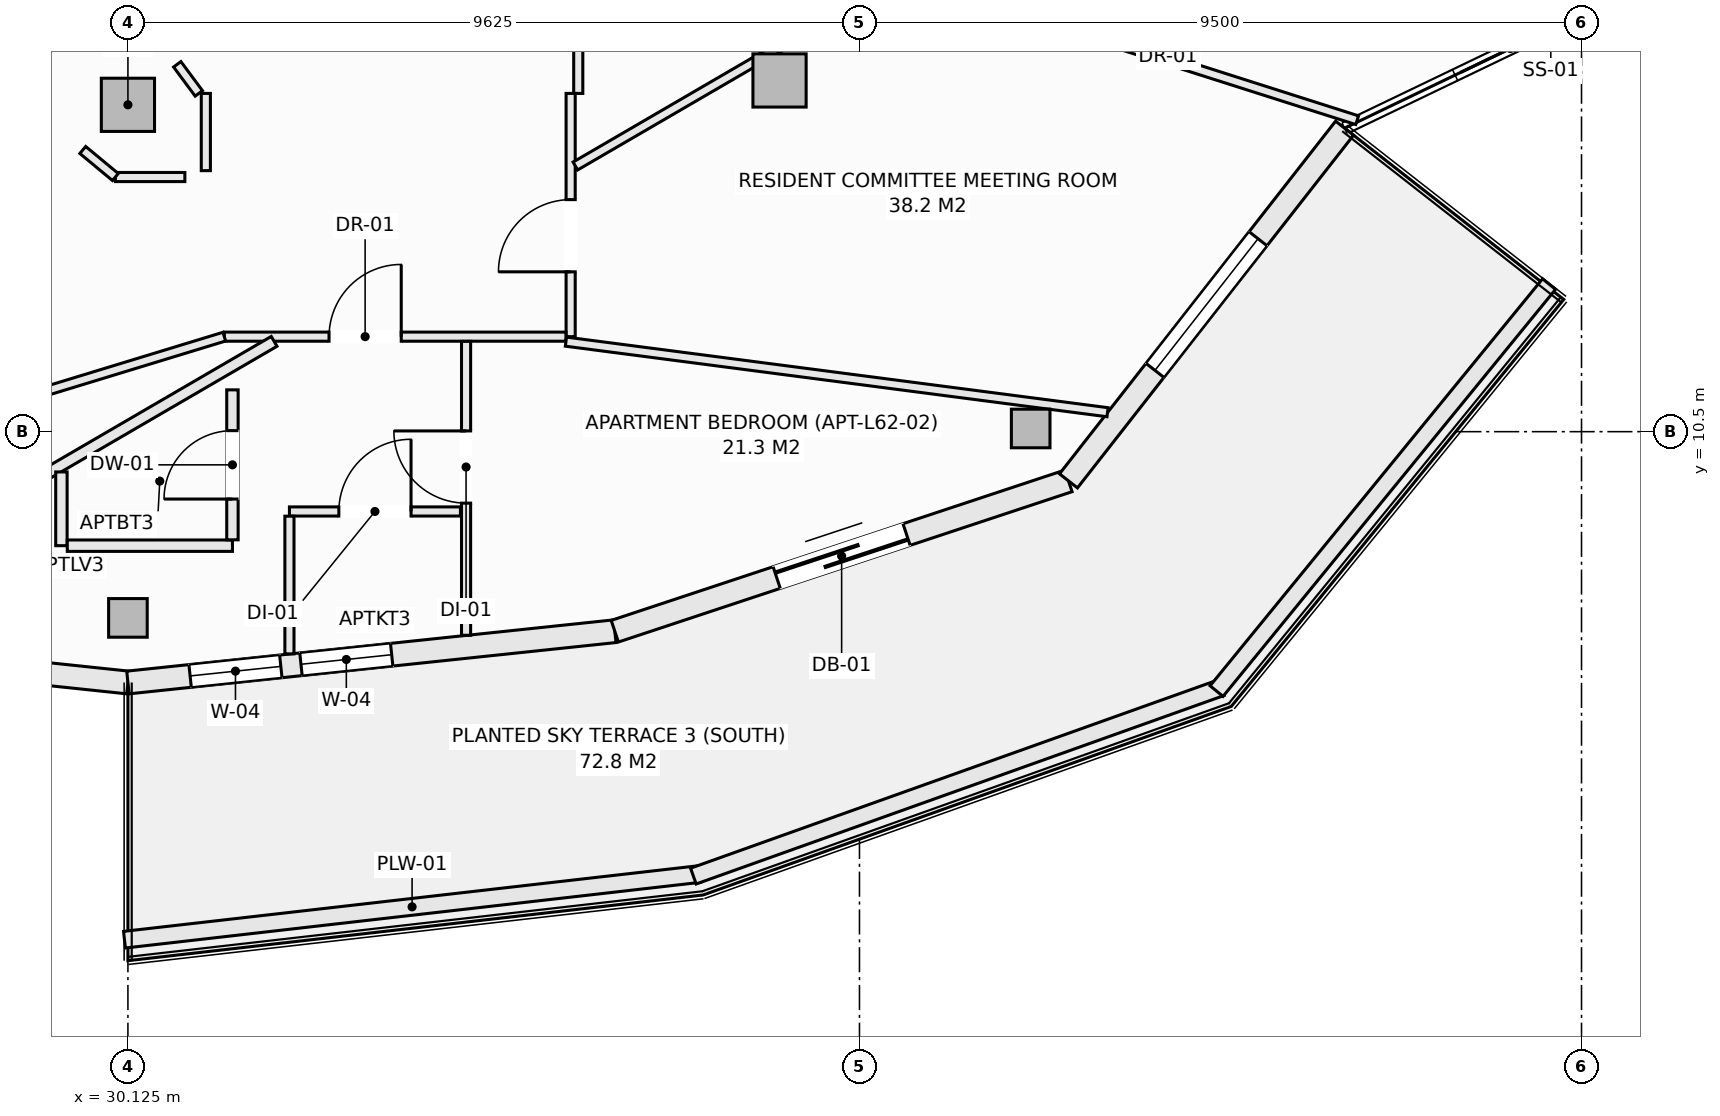
"""IFC4 building model, lengths in metres.
Left out: names, types, materials, properties, quantities, classifications, styles, units other than length and angle.
Written with IfcOpenShell. Run it as: python <this file> out.ifc"""

import sys

from ifc_helpers import new_model, si_unit, direction, frame, frame_2d, origin, origin_2d, place, context, subcontext, project, spatial, rectangle, hollow_rectangle, extrude, element, fill, save


model = new_model("IFC4")
c1 = context("Model", 3, precision=1e-05, world=origin(), true_north=direction((0.0, 1.0)))
c2 = subcontext(c1, "Body", "Model", "MODEL_VIEW")
j1 = project(units=[si_unit("LENGTHUNIT", "METRE"), si_unit("PLANEANGLEUNIT", "RADIAN")], contexts=[c1])
p1 = place(None, origin())
s1 = spatial("IfcSite", under=j1, at=p1, CompositionType="ELEMENT")
p2 = place(p1, origin())
s2 = spatial("IfcBuilding", under=s1, at=p2, CompositionType="ELEMENT")
p3 = place(p2, frame((0.0, 0.0, 232.7)))
s3 = spatial("IfcBuildingStorey", under=s2, at=p3, CompositionType="ELEMENT", Elevation=232.7)
for number, where, z_axis, x_axis in (
    (1, (30.125, 8.05, -0.27), (0.0, 0.0, 1.0), (1.0, 0.0, 0.0)),
    (2, (42.003, 10.542, -0.27), (0.0, 0.0, 1.0), (1.0, 0.0, 0.0)),
):
    element("IfcColumn", number, at=place(p3, frame(where, z_axis=z_axis, x_axis=x_axis)), inside=s3, PredefinedType="COLUMN", context=c2, shape_type="SweptSolid", body=[
        extrude(hollow_rectangle(XDim=0.508, YDim=0.508, WallThickness=0.019, at=origin_2d()), origin(), (0.0, 0.0, 1.0), 3.3),
    ])
for number, where, z_axis, x_axis in (
    (3, (30.125, 14.8, -0.27), (0.0, 0.0, 1.0), (1.0, 0.0, 0.0)),
    (4, (38.698, 15.121, -0.27), (0.0, 0.0, 1.0), (1.0, 0.0, 0.0)),
):
    element("IfcColumn", number, at=place(p3, frame(where, z_axis=z_axis, x_axis=x_axis)), inside=s3, PredefinedType="COLUMN", context=c2, shape_type="SweptSolid", body=[
        extrude(rectangle(XDim=0.7, YDim=0.7, at=origin_2d()), origin(), (0.0, 0.0, 1.0), 3.3),
    ])
p4 = place(p3, frame((23.719, 7.875, 0.0), z_axis=(0.0, 0.0, 1.0), x_axis=(0.994497142298, -0.104763705363, 0.0)))
e5 = element("IfcWall", 5, at=p4, inside=s3, PredefinedType="SOLIDWALL", context=c2, shape_type="SweptSolid", body=[
    extrude(rectangle(XDim=6.441, YDim=0.3, at=frame_2d((3.221, 0.0))), origin(), (0.0, 0.0, 1.0), 2.605),
])
p5 = place(p4, frame((2.121, 0.0, 0.72)))
e6 = element("IfcOpeningElement", 6, at=p5, cuts=e5, PredefinedType="OPENING", context=c2, shape_type="SweptSolid", body=[
    extrude(rectangle(XDim=2.2, YDim=1.65, at=frame_2d((1.1, 0.825))), frame((0.0, 0.16, 0.0), z_axis=(0.0, -1.0, 0.0), x_axis=(1.0, 0.0, 0.0)), (0.0, 0.0, 1.0), 0.32),
])
p6 = place(p3, frame((30.125, 7.2, 0.0), z_axis=(0.0, 0.0, 1.0), x_axis=(0.994497142298, 0.104763705363, 0.0)))
e7 = element("IfcWall", 7, at=p6, inside=s3, PredefinedType="SOLIDWALL", context=c2, shape_type="SweptSolid", body=[
    extrude(rectangle(XDim=6.441, YDim=0.3, at=frame_2d((3.221, 0.0))), origin(), (0.0, 0.0, 1.0), 2.605),
])
p7 = place(p6, frame((0.823, 0.0, 0.72)))
e8 = element("IfcOpeningElement", 8, at=p7, cuts=e7, PredefinedType="OPENING", context=c2, shape_type="SweptSolid", body=[
    extrude(rectangle(XDim=1.2, YDim=1.65, at=frame_2d((0.6, 0.825))), frame((0.0, 0.16, 0.0), z_axis=(0.0, -1.0, 0.0), x_axis=(1.0, 0.0, 0.0)), (0.0, 0.0, 1.0), 0.32),
])
p8 = place(p6, frame((2.289, 0.0, 0.72)))
e9 = element("IfcOpeningElement", 9, at=p8, cuts=e7, PredefinedType="OPENING", context=c2, shape_type="SweptSolid", body=[
    extrude(rectangle(XDim=1.2, YDim=1.65, at=frame_2d((0.6, 0.825))), frame((0.0, 0.16, 0.0), z_axis=(0.0, -1.0, 0.0), x_axis=(1.0, 0.0, 0.0)), (0.0, 0.0, 1.0), 0.32),
])
p9 = place(p3, frame((36.531, 7.875, 0.0), z_axis=(0.0, 0.0, 1.0), x_axis=(0.949240877604, 0.314550085495, 0.0)))
e10 = element("IfcWall", 10, at=p9, inside=s3, PredefinedType="SOLIDWALL", context=c2, shape_type="SweptSolid", body=[
    extrude(rectangle(XDim=6.288, YDim=0.3, at=frame_2d((3.144, 0.0))), origin(), (0.0, 0.0, 1.0), 2.605),
])
p10 = place(p9, frame((2.244, 0.0, 0.0)))
e11 = element("IfcOpeningElement", 11, at=p10, cuts=e10, PredefinedType="OPENING", context=c2, shape_type="SweptSolid", body=[
    extrude(rectangle(XDim=1.8, YDim=2.25, at=frame_2d((0.9, 1.125))), frame((0.0, 0.16, 0.0), z_axis=(0.0, -1.0, 0.0), x_axis=(1.0, 0.0, 0.0)), (0.0, 0.0, 1.0), 0.32),
])
p11 = place(p3, frame((42.5, 9.853, 0.0), z_axis=(0.0, 0.0, 1.0), x_axis=(0.616450126935, 0.787393955401, 0.0)))
e12 = element("IfcWall", 12, at=p11, inside=s3, PredefinedType="SOLIDWALL", context=c2, shape_type="SweptSolid", body=[
    extrude(rectangle(XDim=5.893, YDim=0.3, at=frame_2d((2.946, 0.0))), origin(), (0.0, 0.0, 1.0), 2.605),
])
p12 = place(p11, frame((1.846, 0.0, 0.72)))
e13 = element("IfcOpeningElement", 13, at=p12, cuts=e12, PredefinedType="OPENING", context=c2, shape_type="SweptSolid", body=[
    extrude(rectangle(XDim=2.2, YDim=1.65, at=frame_2d((1.1, 0.825))), frame((0.0, 0.16, 0.0), z_axis=(0.0, -1.0, 0.0), x_axis=(1.0, 0.0, 0.0)), (0.0, 0.0, 1.0), 0.32),
])
p13 = place(p3, frame((30.08, 3.816, 0.0), z_axis=(0.0, 0.0, 1.0), x_axis=(0.993546198781, 0.113428175021, 0.0)))
e14 = element("IfcWall", 14, at=p13, inside=s3, PredefinedType="PARAPET", context=c2, shape_type="SweptSolid", body=[
    extrude(rectangle(XDim=7.617, YDim=0.22, at=frame_2d((3.809, 0.0))), origin(), (0.0, 0.0, 1.0), 0.52),
])
p14 = place(p3, frame((37.565, 4.653, 0.0), z_axis=(0.0, 0.0, 1.0), x_axis=(0.941780086523, 0.336229488042, 0.0)))
e15 = element("IfcWall", 15, at=p14, inside=s3, PredefinedType="PARAPET", context=c2, shape_type="SweptSolid", body=[
    extrude(rectangle(XDim=7.378, YDim=0.22, at=frame_2d((3.689, 0.0))), origin(), (0.0, 0.0, 1.0), 0.52),
])
p15 = place(p3, frame((44.448, 7.087, 0.0), z_axis=(0.0, 0.0, 1.0), x_axis=(0.632697312147, 0.774399193699, 0.0)))
e16 = element("IfcWall", 16, at=p15, inside=s3, PredefinedType="PARAPET", context=c2, shape_type="SweptSolid", body=[
    extrude(rectangle(XDim=6.914, YDim=0.22, at=frame_2d((3.457, 0.0))), origin(), (0.0, 0.0, 1.0), 0.52),
])
p16 = place(p3, frame((36.05, 14.95, 0.0), z_axis=(0.0, 0.0, 1.0), x_axis=(0.0, 1.0, 0.0)))
e17 = element("IfcWall", 17, at=p16, inside=s3, PredefinedType="PARTITIONING", context=c2, shape_type="SweptSolid", body=[
    extrude(rectangle(XDim=2.578, YDim=0.12, at=frame_2d((1.289, 0.0))), origin(), (0.0, 0.0, 1.0), 3.03),
])
p17 = place(p3, frame((35.95, 11.75, 0.0), z_axis=(0.0, 0.0, 1.0), x_axis=(0.0, 1.0, 0.0)))
e18 = element("IfcWall", 18, at=p17, inside=s3, PredefinedType="PARTITIONING", context=c2, shape_type="SweptSolid", body=[
    extrude(rectangle(XDim=3.2, YDim=0.12, at=frame_2d((1.6, 0.0))), origin(), (0.0, 0.0, 1.0), 3.03),
])
p18 = place(p17, frame((0.853, 0.0, 0.0)))
e19 = element("IfcOpeningElement", 19, at=p18, cuts=e18, PredefinedType="OPENING", context=c2, shape_type="SweptSolid", body=[
    extrude(rectangle(XDim=0.95, YDim=2.1, at=frame_2d((0.475, 1.05))), frame((0.0, 0.07, 0.0), z_axis=(0.0, -1.0, 0.0), x_axis=(1.0, 0.0, 0.0)), (0.0, 0.0, 1.0), 0.14),
])
p19 = place(p3, frame((31.393, 11.75, 0.0), z_axis=(0.0, 0.0, 1.0), x_axis=(1.0, 0.0, 0.0)))
e20 = element("IfcWall", 20, at=p19, inside=s3, PredefinedType="PARTITIONING", context=c2, shape_type="SweptSolid", body=[
    extrude(rectangle(XDim=4.495, YDim=0.12, at=frame_2d((2.248, 0.0))), origin(), (0.0, 0.0, 1.0), 3.03),
])
p20 = place(p19, frame((1.378, 0.0, 0.0)))
e21 = element("IfcOpeningElement", 21, at=p20, cuts=e20, PredefinedType="OPENING", context=c2, shape_type="SweptSolid", body=[
    extrude(rectangle(XDim=0.95, YDim=2.1, at=frame_2d((0.475, 1.05))), frame((0.0, 0.07, 0.0), z_axis=(0.0, -1.0, 0.0), x_axis=(1.0, 0.0, 0.0)), (0.0, 0.0, 1.0), 0.14),
])
p21 = place(p3, frame((28.752, 10.944, 0.0), z_axis=(0.0, 0.0, 1.0), x_axis=(0.956462690075, 0.291854625618, 0.0)))
e22 = element("IfcWall", 22, at=p21, inside=s3, PredefinedType="PARTITIONING", context=c2, shape_type="SweptSolid", body=[
    extrude(rectangle(XDim=2.761, YDim=0.12, at=frame_2d((1.381, 0.0))), origin(), (0.0, 0.0, 1.0), 3.03),
])
p22 = place(p3, frame((29.96, 13.85, 0.0), z_axis=(0.0, 0.0, 1.0), x_axis=(1.0, 0.0, 0.0)))
e23 = element("IfcWall", 23, at=p22, inside=s3, PredefinedType="PARTITIONING", context=c2, shape_type="SweptSolid", body=[
    extrude(rectangle(XDim=0.914, YDim=0.12, at=frame_2d((0.457, 0.0))), origin(), (0.0, 0.0, 1.0), 3.03),
])
p23 = place(p3, frame((31.15, 13.934, 0.0), z_axis=(0.0, 0.0, 1.0), x_axis=(0.0, 1.0, 0.0)))
e24 = element("IfcWall", 24, at=p23, inside=s3, PredefinedType="PARTITIONING", context=c2, shape_type="SweptSolid", body=[
    extrude(rectangle(XDim=1.016, YDim=0.12, at=frame_2d((0.508, 0.0))), origin(), (0.0, 0.0, 1.0), 3.03),
])
p24 = place(p3, frame((30.774, 15.333, 0.0), z_axis=(0.0, 0.0, 1.0), x_axis=(0.595814974861, -0.803121731577, 0.0)))
e25 = element("IfcWall", 25, at=p24, inside=s3, PredefinedType="PARTITIONING", context=c2, shape_type="SweptSolid", body=[
    extrude(rectangle(XDim=0.477, YDim=0.12, at=frame_2d((0.239, 0.0))), origin(), (0.0, 0.0, 1.0), 3.03),
])
p25 = place(p3, frame((29.531, 14.206, 0.0), z_axis=(0.0, 0.0, 1.0), x_axis=(0.7695479554, -0.638589026166, 0.0)))
e26 = element("IfcWall", 26, at=p25, inside=s3, PredefinedType="PARTITIONING", context=c2, shape_type="SweptSolid", body=[
    extrude(rectangle(XDim=0.557, YDim=0.12, at=frame_2d((0.279, 0.0))), origin(), (0.0, 0.0, 1.0), 3.03),
])
p26 = place(p3, frame((25.447, 7.846, 0.0), z_axis=(0.0, 0.0, 1.0), x_axis=(0.864278106544, 0.503014268732, 0.0)))
e27 = element("IfcWall", 27, at=p26, inside=s3, PredefinedType="PARTITIONING", context=c2, shape_type="SweptSolid", body=[
    extrude(rectangle(XDim=7.638, YDim=0.15, at=frame_2d((3.819, 0.0))), origin(), (0.0, 0.0, 1.0), 3.03),
])
p27 = place(p3, frame((36.012, 13.995, 0.0), z_axis=(0.0, 0.0, 1.0), x_axis=(0.864278013608, 0.503014428415, 0.0)))
e28 = element("IfcWall", 28, at=p27, inside=s3, PredefinedType="PARTITIONING", context=c2, shape_type="SweptSolid", body=[
    extrude(rectangle(XDim=4.857, YDim=0.12, at=frame_2d((2.428, 0.0))), origin(), (0.0, 0.0, 1.0), 2.478),
])
p28 = place(p3, frame((34.574, 7.821, 0.0), z_axis=(0.0, 0.0, 1.0), x_axis=(0.0, 1.0, 0.0)))
e29 = element("IfcWall", 29, at=p28, inside=s3, PredefinedType="PARTITIONING", context=c2, shape_type="SweptSolid", body=[
    extrude(rectangle(XDim=3.867, YDim=0.12, at=frame_2d((1.933, 0.0))), origin(), (0.0, 0.0, 1.0), 3.03),
])
p29 = place(p28, frame((1.738, 0.0, 0.0)))
e30 = element("IfcOpeningElement", 30, at=p29, cuts=e29, PredefinedType="OPENING", context=c2, shape_type="SweptSolid", body=[
    extrude(rectangle(XDim=0.95, YDim=2.1, at=frame_2d((0.475, 1.05))), frame((0.0, 0.07, 0.0), z_axis=(0.0, -1.0, 0.0), x_axis=(1.0, 0.0, 0.0)), (0.0, 0.0, 1.0), 0.14),
])
p30 = place(p3, frame((32.25, 9.45, 0.0), z_axis=(0.0, 0.0, 1.0), x_axis=(1.0, 0.0, 0.0)))
e31 = element("IfcWall", 31, at=p30, inside=s3, PredefinedType="PARTITIONING", context=c2, shape_type="SweptSolid", body=[
    extrude(rectangle(XDim=2.25, YDim=0.12, at=frame_2d((1.125, 0.0))), origin(), (0.0, 0.0, 1.0), 3.03),
])
p31 = place(p30, frame((0.65, 0.0, 0.0)))
e32 = element("IfcOpeningElement", 32, at=p31, cuts=e31, PredefinedType="OPENING", context=c2, shape_type="SweptSolid", body=[
    extrude(rectangle(XDim=0.95, YDim=2.1, at=frame_2d((0.475, 1.05))), frame((0.0, 0.07, 0.0), z_axis=(0.0, -1.0, 0.0), x_axis=(1.0, 0.0, 0.0)), (0.0, 0.0, 1.0), 0.14),
])
p32 = place(p3, frame((32.25, 7.577, 0.0), z_axis=(0.0, 0.0, 1.0), x_axis=(0.0, 1.0, 0.0)))
e33 = element("IfcWall", 33, at=p32, inside=s3, PredefinedType="PARTITIONING", context=c2, shape_type="SweptSolid", body=[
    extrude(rectangle(XDim=1.811, YDim=0.12, at=frame_2d((0.906, 0.0))), origin(), (0.0, 0.0, 1.0), 3.03),
])
p33 = place(p3, frame((29.25, 9.0, 0.0), z_axis=(0.0, 0.0, 1.0), x_axis=(0.0, 1.0, 0.0)))
e34 = element("IfcWall", 34, at=p33, inside=s3, PredefinedType="PARTITIONING", context=c2, shape_type="SweptSolid", body=[
    extrude(rectangle(XDim=0.97, YDim=0.15, at=frame_2d((0.485, 0.0))), origin(), (0.0, 0.0, 1.0), 3.03),
])
p34 = place(p3, frame((29.327, 9.0, 0.0), z_axis=(0.0, 0.0, 1.0), x_axis=(1.0, 0.0, 0.0)))
e35 = element("IfcWall", 35, at=p34, inside=s3, PredefinedType="PARTITIONING", context=c2, shape_type="SweptSolid", body=[
    extrude(rectangle(XDim=2.173, YDim=0.15, at=frame_2d((1.086, 0.0))), origin(), (0.0, 0.0, 1.0), 3.03),
])
p35 = place(p3, frame((31.5, 9.077, 0.0), z_axis=(0.0, 0.0, 1.0), x_axis=(0.0, 1.0, 0.0)))
e36 = element("IfcWall", 36, at=p35, inside=s3, PredefinedType="PARTITIONING", context=c2, shape_type="SweptSolid", body=[
    extrude(rectangle(XDim=1.973, YDim=0.15, at=frame_2d((0.987, 0.0))), origin(), (0.0, 0.0, 1.0), 3.03),
])
p36 = place(p35, frame((0.537, 0.0, 0.0)))
e37 = element("IfcOpeningElement", 37, at=p36, cuts=e36, PredefinedType="OPENING", context=c2, shape_type="SweptSolid", body=[
    extrude(rectangle(XDim=0.9, YDim=2.1, at=frame_2d((0.45, 1.05))), frame((0.0, 0.085, 0.0), z_axis=(0.0, -1.0, 0.0), x_axis=(1.0, 0.0, 0.0)), (0.0, 0.0, 1.0), 0.17),
])
p37 = place(p3, frame((35.888, 11.684, 0.0), z_axis=(0.0, 0.0, 1.0), x_axis=(0.991622750781, -0.129167798358, 0.0)))
e38 = element("IfcWall", 38, at=p37, inside=s3, PredefinedType="PARTITIONING", context=c2, shape_type="SweptSolid", body=[
    extrude(rectangle(XDim=7.186, YDim=0.12, at=frame_2d((3.593, 0.0))), origin(), (0.0, 0.0, 1.0), 3.03),
])
p38 = place(p3, frame((40.709, 16.378, 0.0), z_axis=(0.0, 0.0, 1.0), x_axis=(0.952839371161, -0.303475094144, 0.0)))
e39 = element("IfcWall", 39, at=p38, inside=s3, PredefinedType="PARTITIONING", context=c2, shape_type="SweptSolid", body=[
    extrude(rectangle(XDim=5.865, YDim=0.12, at=frame_2d((2.933, 0.0))), origin(), (0.0, 0.0, 1.0), 2.77),
])
p39 = place(p7, origin())
e40 = element("IfcWindow", 40, at=p39, inside=s3, PartitioningType="SINGLE_PANEL", PredefinedType="WINDOW", context=c2, shape_type="SweptSolid", body=[
    extrude(rectangle(XDim=1.2, YDim=1.65, at=frame_2d((0.6, 0.825))), frame((0.0, 0.03, 0.0), z_axis=(0.0, -1.0, 0.0), x_axis=(1.0, 0.0, 0.0)), (0.0, 0.0, 1.0), 0.06),
])
fill(e8, e40)
p40 = place(p10, frame((1.8, 0.0, 0.0), z_axis=(0.0, 0.0, 1.0), x_axis=(-1.0, 0.0, 0.0)))
e41 = element("IfcDoor", 41, at=p40, inside=s3, OperationType="SLIDING_TO_LEFT", PredefinedType="DOOR", context=c2, shape_type="SweptSolid", body=[
    extrude(rectangle(XDim=1.8, YDim=2.25, at=frame_2d((0.9, 1.125))), frame((0.0, 0.025, 0.0), z_axis=(0.0, -1.0, 0.0), x_axis=(1.0, 0.0, 0.0)), (0.0, 0.0, 1.0), 0.05),
])
fill(e11, e41)
p41 = place(p12, origin())
e42 = element("IfcWindow", 42, at=p41, inside=s3, PartitioningType="SINGLE_PANEL", PredefinedType="WINDOW", context=c2, shape_type="SweptSolid", body=[
    extrude(rectangle(XDim=2.2, YDim=1.65, at=frame_2d((1.1, 0.825))), frame((0.0, 0.03, 0.0), z_axis=(0.0, -1.0, 0.0), x_axis=(1.0, 0.0, 0.0)), (0.0, 0.0, 1.0), 0.06),
])
fill(e13, e42)
p42 = place(p20, origin())
e43 = element("IfcDoor", 43, at=p42, inside=s3, OperationType="SINGLE_SWING_RIGHT", PredefinedType="DOOR", context=c2, shape_type="SweptSolid", body=[
    extrude(rectangle(XDim=0.95, YDim=2.1, at=frame_2d((0.475, 1.05))), frame((0.0, 0.025, 0.0), z_axis=(0.0, -1.0, 0.0), x_axis=(1.0, 0.0, 0.0)), (0.0, 0.0, 1.0), 0.05),
])
fill(e21, e43)
p43 = place(p18, origin())
e44 = element("IfcDoor", 44, at=p43, inside=s3, OperationType="SINGLE_SWING_LEFT", PredefinedType="DOOR", context=c2, shape_type="SweptSolid", body=[
    extrude(rectangle(XDim=0.95, YDim=2.1, at=frame_2d((0.475, 1.05))), frame((0.0, 0.025, 0.0), z_axis=(0.0, -1.0, 0.0), x_axis=(1.0, 0.0, 0.0)), (0.0, 0.0, 1.0), 0.05),
])
fill(e19, e44)
p44 = place(p31, origin())
e45 = element("IfcDoor", 45, at=p44, inside=s3, OperationType="SINGLE_SWING_RIGHT", PredefinedType="DOOR", context=c2, shape_type="SweptSolid", body=[
    extrude(rectangle(XDim=0.95, YDim=2.1, at=frame_2d((0.475, 1.05))), frame((0.0, 0.025, 0.0), z_axis=(0.0, -1.0, 0.0), x_axis=(1.0, 0.0, 0.0)), (0.0, 0.0, 1.0), 0.05),
])
fill(e32, e45)
p45 = place(p36, origin())
e46 = element("IfcDoor", 46, at=p45, inside=s3, OperationType="SINGLE_SWING_LEFT", PredefinedType="DOOR", context=c2, shape_type="SweptSolid", body=[
    extrude(rectangle(XDim=0.9, YDim=2.1, at=frame_2d((0.45, 1.05))), frame((0.0, 0.025, 0.0), z_axis=(0.0, -1.0, 0.0), x_axis=(1.0, 0.0, 0.0)), (0.0, 0.0, 1.0), 0.05),
])
fill(e37, e46)
p46 = place(p29, origin())
e47 = element("IfcDoor", 47, at=p46, inside=s3, OperationType="SINGLE_SWING_RIGHT", PredefinedType="DOOR", context=c2, shape_type="SweptSolid", body=[
    extrude(rectangle(XDim=0.95, YDim=2.1, at=frame_2d((0.475, 1.05))), frame((0.0, 0.025, 0.0), z_axis=(0.0, -1.0, 0.0), x_axis=(1.0, 0.0, 0.0)), (0.0, 0.0, 1.0), 0.05),
])
fill(e30, e47)
p47 = place(p8, origin())
e48 = element("IfcWindow", 48, at=p47, inside=s3, PartitioningType="SINGLE_PANEL", PredefinedType="WINDOW", context=c2, shape_type="SweptSolid", body=[
    extrude(rectangle(XDim=1.2, YDim=1.65, at=frame_2d((0.6, 0.825))), frame((0.0, 0.03, 0.0), z_axis=(0.0, -1.0, 0.0), x_axis=(1.0, 0.0, 0.0)), (0.0, 0.0, 1.0), 0.06),
])
fill(e9, e48)
save(model, sys.argv[1])
